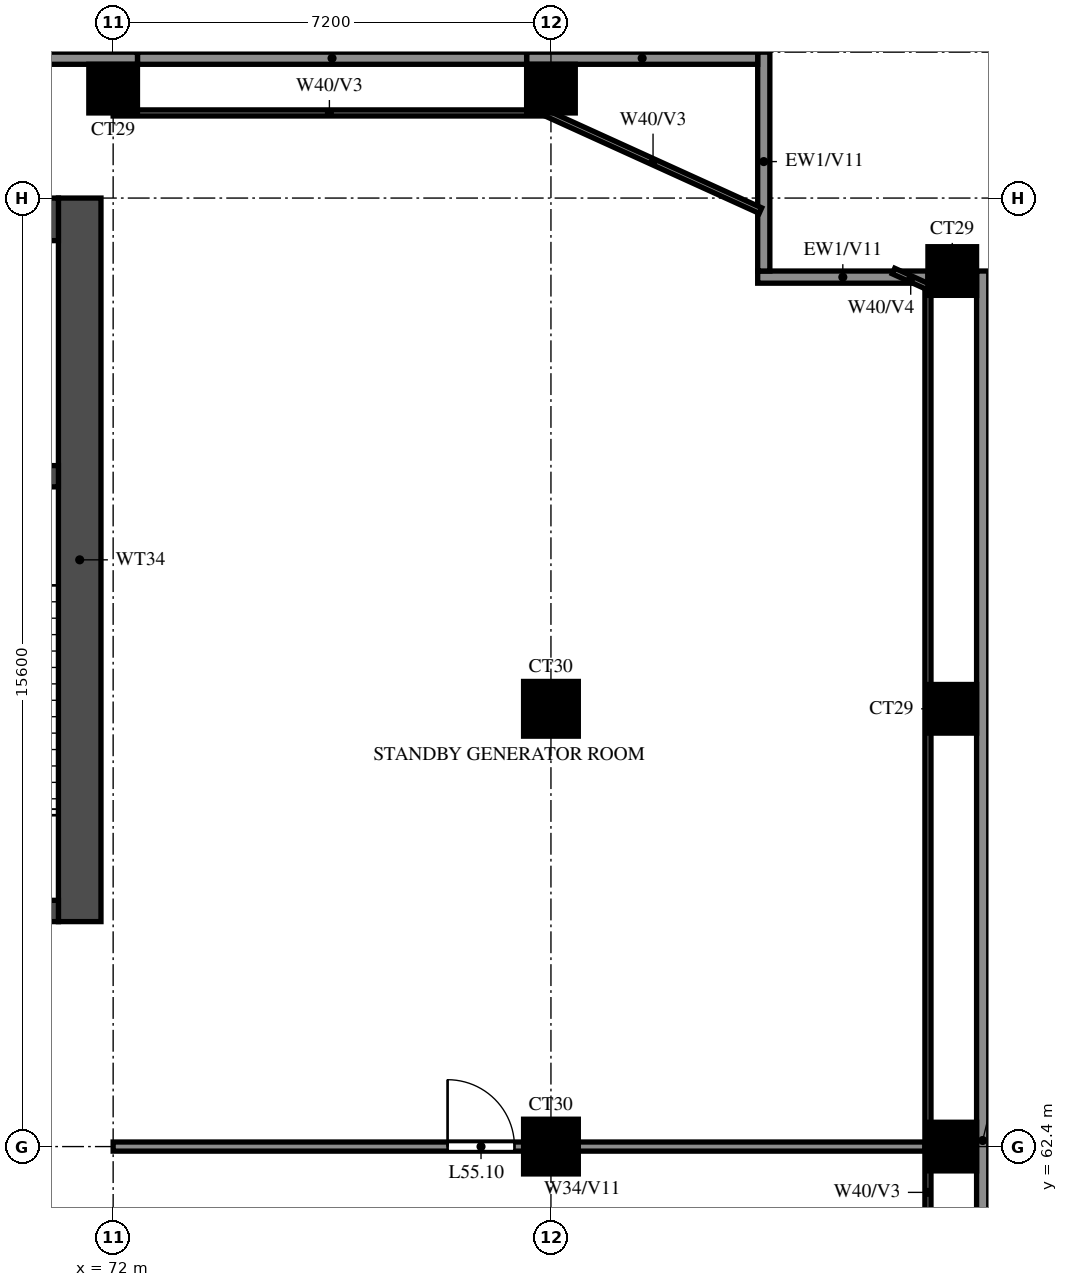
"""IFC4 building model, lengths in metres.
Left out: names, types, materials, properties, quantities, classifications, styles, units other than length and angle.
Written with IfcOpenShell. Run it as: python <this file> out.ifc"""

import sys

from ifc_helpers import new_model, si_unit, direction, frame, frame_2d, origin, origin_2d, place, context, subcontext, project, spatial, rectangle, extrude, source, transform, mapped, element, fill, save


model = new_model("IFC4")
c1 = context("Model", 3, precision=1e-05, world=origin(), true_north=direction((0.0, 1.0)))
c2 = subcontext(c1, "Body", "Model", "MODEL_VIEW")
j1 = project(units=[si_unit("LENGTHUNIT", "METRE"), si_unit("PLANEANGLEUNIT", "RADIAN")], contexts=[c1])
p1 = place(None, origin())
s1 = spatial("IfcSite", under=j1, at=p1, CompositionType="ELEMENT")
p2 = place(p1, origin())
s2 = spatial("IfcBuilding", under=s1, at=p2, CompositionType="ELEMENT")
p3 = place(p2, frame((0.0, 0.0, 206.0)))
s3 = spatial("IfcBuildingStorey", under=s2, at=p3, CompositionType="ELEMENT", Elevation=206.0)
m1 = source(origin(), c2, "Body", "SweptSolid", [
    extrude(rectangle(XDim=0.9, YDim=0.9, at=origin_2d()), origin(), (0.0, 0.0, 1.0), 5.22),
])
p4 = place(p3, frame((79.2, 62.4, 0.0), z_axis=(0.0, 0.0, 1.0), x_axis=(1.0, 0.0, 0.0)))
e1 = element("IfcColumn", 1, at=p4, inside=s3, PredefinedType="COLUMN", context=c2, shape_type="MappedRepresentation", body=[
    mapped(m1, transform((0.0, 0.0, 0.0))),
])
m2 = source(origin(), c2, "Body", "SweptSolid", [
    extrude(rectangle(XDim=0.8, YDim=0.8, at=origin_2d()), origin(), (0.0, 0.0, 1.0), 5.22),
])
p5 = place(p3, frame((85.8, 62.4, 0.0), z_axis=(0.0, 0.0, 1.0), x_axis=(1.0, 0.0, 0.0)))
e2 = element("IfcColumn", 2, at=p5, inside=s3, PredefinedType="COLUMN", context=c2, shape_type="MappedRepresentation", body=[
    mapped(m2, transform((0.0, 0.0, 0.0))),
])
p6 = place(p3, frame((79.2, 69.6, 0.0), z_axis=(0.0, 0.0, 1.0), x_axis=(1.0, 0.0, 0.0)))
e3 = element("IfcColumn", 3, at=p6, inside=s3, PredefinedType="COLUMN", context=c2, shape_type="MappedRepresentation", body=[
    mapped(m1, transform((0.0, 0.0, 0.0))),
])
for number, where, z_axis, x_axis in (
    (4, (85.8, 69.6, 0.0), (0.0, 0.0, 1.0), (1.0, 0.0, 0.0)),
    (5, (85.8, 76.8, 0.0), (0.0, 0.0, 1.0), (1.0, 0.0, 0.0)),
    (6, (72.0, 79.8, 0.0), (0.0, 0.0, 1.0), (1.0, 0.0, 0.0)),
    (7, (79.2, 79.8, 0.0), (0.0, 0.0, 1.0), (1.0, 0.0, 0.0)),
):
    element("IfcColumn", number, at=place(p3, frame(where, z_axis=z_axis, x_axis=x_axis)), inside=s3, PredefinedType="COLUMN", context=c2, shape_type="MappedRepresentation", body=[
        mapped(m2, transform((0.0, 0.0, 0.0))),
    ])
p7 = place(p3, frame((71.45, 66.1, 0.0), z_axis=(0.0, 0.0, 1.0), x_axis=(0.0, 1.0, 0.0)))
e8 = element("IfcWall", 8, at=p7, inside=s3, PredefinedType="SHEAR", context=c2, shape_type="SweptSolid", body=[
    extrude(rectangle(XDim=11.9, YDim=0.7, at=frame_2d((5.95, 0.0))), origin(), (0.0, 0.0, 1.0), 5.22),
])
p8 = place(p3, frame((29.7, 77.65, 0.0), z_axis=(0.0, 0.0, 1.0), x_axis=(1.0, 0.0, 0.0)))
e9 = element("IfcWall", 9, at=p8, inside=s3, PredefinedType="SHEAR", context=c2, shape_type="SweptSolid", body=[
    extrude(rectangle(XDim=41.4, YDim=0.7, at=frame_2d((20.7, 0.0))), origin(), (0.0, 0.0, 1.0), 5.22),
])
p9 = place(p3, frame((29.7, 66.275, 0.0), z_axis=(0.0, 0.0, 1.0), x_axis=(1.0, 0.0, 0.0)))
e10 = element("IfcWall", 10, at=p9, inside=s3, PredefinedType="SHEAR", context=c2, shape_type="SweptSolid", body=[
    extrude(rectangle(XDim=41.4, YDim=0.35, at=frame_2d((20.7, 0.0))), origin(), (0.0, 0.0, 1.0), 5.22),
])
p10 = place(p9, frame((0.925, 0.0, 0.0)))
e11 = element("IfcOpeningElement", 11, at=p10, cuts=e10, PredefinedType="OPENING", context=c2, shape_type="SweptSolid", body=[
    extrude(rectangle(XDim=1.1, YDim=2.1, at=frame_2d((0.55, 1.05))), frame((0.0, 0.185, 0.0), z_axis=(0.0, -1.0, 0.0), x_axis=(1.0, 0.0, 0.0)), (0.0, 0.0, 1.0), 0.37),
])
p11 = place(p9, frame((3.712, 0.0, 0.0)))
e12 = element("IfcOpeningElement", 12, at=p11, cuts=e10, PredefinedType="OPENING", context=c2, shape_type="SweptSolid", body=[
    extrude(rectangle(XDim=1.8, YDim=2.1, at=frame_2d((0.9, 1.05))), frame((0.0, 0.185, 0.0), z_axis=(0.0, -1.0, 0.0), x_axis=(1.0, 0.0, 0.0)), (0.0, 0.0, 1.0), 0.37),
])
p12 = place(p3, frame((67.975, 73.425, 0.0), z_axis=(0.0, 0.0, 1.0), x_axis=(1.0, 0.0, 0.0)))
e13 = element("IfcWall", 13, at=p12, inside=s3, PredefinedType="SHEAR", context=c2, shape_type="SweptSolid", body=[
    extrude(rectangle(XDim=3.125, YDim=0.35, at=frame_2d((1.562, 0.0))), origin(), (0.0, 0.0, 1.0), 5.22),
])
p13 = place(p3, frame((86.3, 48.2, 0.0), z_axis=(0.0, 0.0, 1.0), x_axis=(0.0, 1.0, 0.0)))
e14 = element("IfcWall", 14, at=p13, inside=s3, PredefinedType="SOLIDWALL", context=c2, shape_type="SweptSolid", body=[
    extrude(rectangle(XDim=28.6, YDim=0.2, at=frame_2d((14.3, 0.0))), origin(), (0.0, 0.0, 1.0), 5.22),
])
p14 = place(p3, frame((85.4, 76.7, 0.0), z_axis=(0.0, 0.0, 1.0), x_axis=(-1.0, 0.0, 0.0)))
e15 = element("IfcWall", 15, at=p14, inside=s3, PredefinedType="SOLIDWALL", context=c2, shape_type="SweptSolid", body=[
    extrude(rectangle(XDim=2.8, YDim=0.2, at=frame_2d((1.4, 0.0))), origin(), (0.0, 0.0, 1.0), 5.22),
])
p15 = place(p3, frame((82.7, 76.8, 0.0), z_axis=(0.0, 0.0, 1.0), x_axis=(0.0, 1.0, 0.0)))
e16 = element("IfcWall", 16, at=p15, inside=s3, PredefinedType="SOLIDWALL", context=c2, shape_type="SweptSolid", body=[
    extrude(rectangle(XDim=3.6, YDim=0.2, at=frame_2d((1.8, 0.0))), origin(), (0.0, 0.0, 1.0), 5.22),
])
p16 = place(p3, frame((82.6, 80.3, 0.0), z_axis=(0.0, 0.0, 1.0), x_axis=(-1.0, 0.0, 0.0)))
e17 = element("IfcWall", 17, at=p16, inside=s3, PredefinedType="SOLIDWALL", context=c2, shape_type="SweptSolid", body=[
    extrude(rectangle(XDim=3.8, YDim=0.2, at=frame_2d((1.9, 0.0))), origin(), (0.0, 0.0, 1.0), 5.22),
])
p17 = place(p3, frame((72.0, 62.4, 0.0), z_axis=(0.0, 0.0, 1.0), x_axis=(1.0, 0.0, 0.0)))
e18 = element("IfcWall", 18, at=p17, inside=s3, PredefinedType="PARTITIONING", context=c2, shape_type="SweptSolid", body=[
    extrude(rectangle(XDim=13.35, YDim=0.15, at=frame_2d((6.675, 0.0))), origin(), (0.0, 0.0, 1.0), 3.72),
])
p18 = place(p17, frame((5.5, 0.0, 0.0)))
e19 = element("IfcOpeningElement", 19, at=p18, cuts=e18, PredefinedType="OPENING", context=c2, shape_type="SweptSolid", body=[
    extrude(rectangle(XDim=1.1, YDim=2.1, at=frame_2d((0.55, 1.05))), frame((0.0, 0.085, 0.0), z_axis=(0.0, -1.0, 0.0), x_axis=(1.0, 0.0, 0.0)), (0.0, 0.0, 1.0), 0.17),
])
p19 = place(p3, frame((72.0, 79.4, 0.0), z_axis=(0.0, 0.0, 1.0), x_axis=(1.0, 0.0, 0.0)))
e20 = element("IfcWall", 20, at=p19, inside=s3, PredefinedType="PARTITIONING", context=c2, shape_type="SweptSolid", body=[
    extrude(rectangle(XDim=7.113, YDim=0.1, at=frame_2d((3.557, 0.0))), origin(), (0.0, 0.0, 1.0), 3.72),
])
p20 = place(p3, frame((85.4, 48.17, 0.0), z_axis=(0.0, 0.0, 1.0), x_axis=(0.0, 1.0, 0.0)))
e21 = element("IfcWall", 21, at=p20, inside=s3, PredefinedType="PARTITIONING", context=c2, shape_type="SweptSolid", body=[
    extrude(rectangle(XDim=28.372, YDim=0.1, at=frame_2d((14.186, 0.0))), origin(), (0.0, 0.0, 1.0), 3.72),
])
p21 = place(p3, frame((82.645, 77.794, 0.0), z_axis=(0.0, 0.0, 1.0), x_axis=(-0.910316907758, 0.413911980316, 0.0)))
e22 = element("IfcWall", 22, at=p21, inside=s3, PredefinedType="PARTITIONING", context=c2, shape_type="SweptSolid", body=[
    extrude(rectangle(XDim=3.88, YDim=0.1, at=frame_2d((1.94, 0.0))), origin(), (0.0, 0.0, 1.0), 3.72),
])
p22 = place(p3, frame((85.4, 76.542, 0.0), z_axis=(0.0, 0.0, 1.0), x_axis=(-0.910138141385, 0.414304916212, 0.0)))
e23 = element("IfcWall", 23, at=p22, inside=s3, PredefinedType="PARTITIONING", context=c2, shape_type="SweptSolid", body=[
    extrude(rectangle(XDim=0.623, YDim=0.1, at=frame_2d((0.312, 0.0))), origin(), (0.0, 0.0, 1.0), 5.22),
])
p23 = place(p3, frame((78.8, 80.3, 0.0), z_axis=(0.0, 0.0, 1.0), x_axis=(-1.0, 0.0, 0.0)))
e24 = element("IfcWall", 24, at=p23, inside=s3, PredefinedType="SOLIDWALL", context=c2, shape_type="SweptSolid", body=[
    extrude(rectangle(XDim=6.4, YDim=0.2, at=frame_2d((3.2, 0.0))), origin(), (0.0, 0.0, 1.0), 3.72),
])
p24 = place(p3, frame((72.4, 80.3, 0.0), z_axis=(0.0, 0.0, 1.0), x_axis=(-1.0, 0.0, 0.0)))
e25 = element("IfcWall", 25, at=p24, inside=s3, PredefinedType="SOLIDWALL", context=c2, shape_type="SweptSolid", body=[
    extrude(rectangle(XDim=44.0, YDim=0.2, at=frame_2d((22.0, 0.0))), origin(), (0.0, 0.0, 1.0), 5.22),
])
p25 = place(p18, origin())
e26 = element("IfcDoor", 26, at=p25, inside=s3, OperationType="SINGLE_SWING_LEFT", PredefinedType="DOOR", context=c2, shape_type="SweptSolid", body=[
    extrude(rectangle(XDim=1.1, YDim=2.1, at=frame_2d((0.55, 1.05))), frame((0.0, 0.025, 0.0), z_axis=(0.0, -1.0, 0.0), x_axis=(1.0, 0.0, 0.0)), (0.0, 0.0, 1.0), 0.05),
])
fill(e19, e26)
save(model, sys.argv[1])
